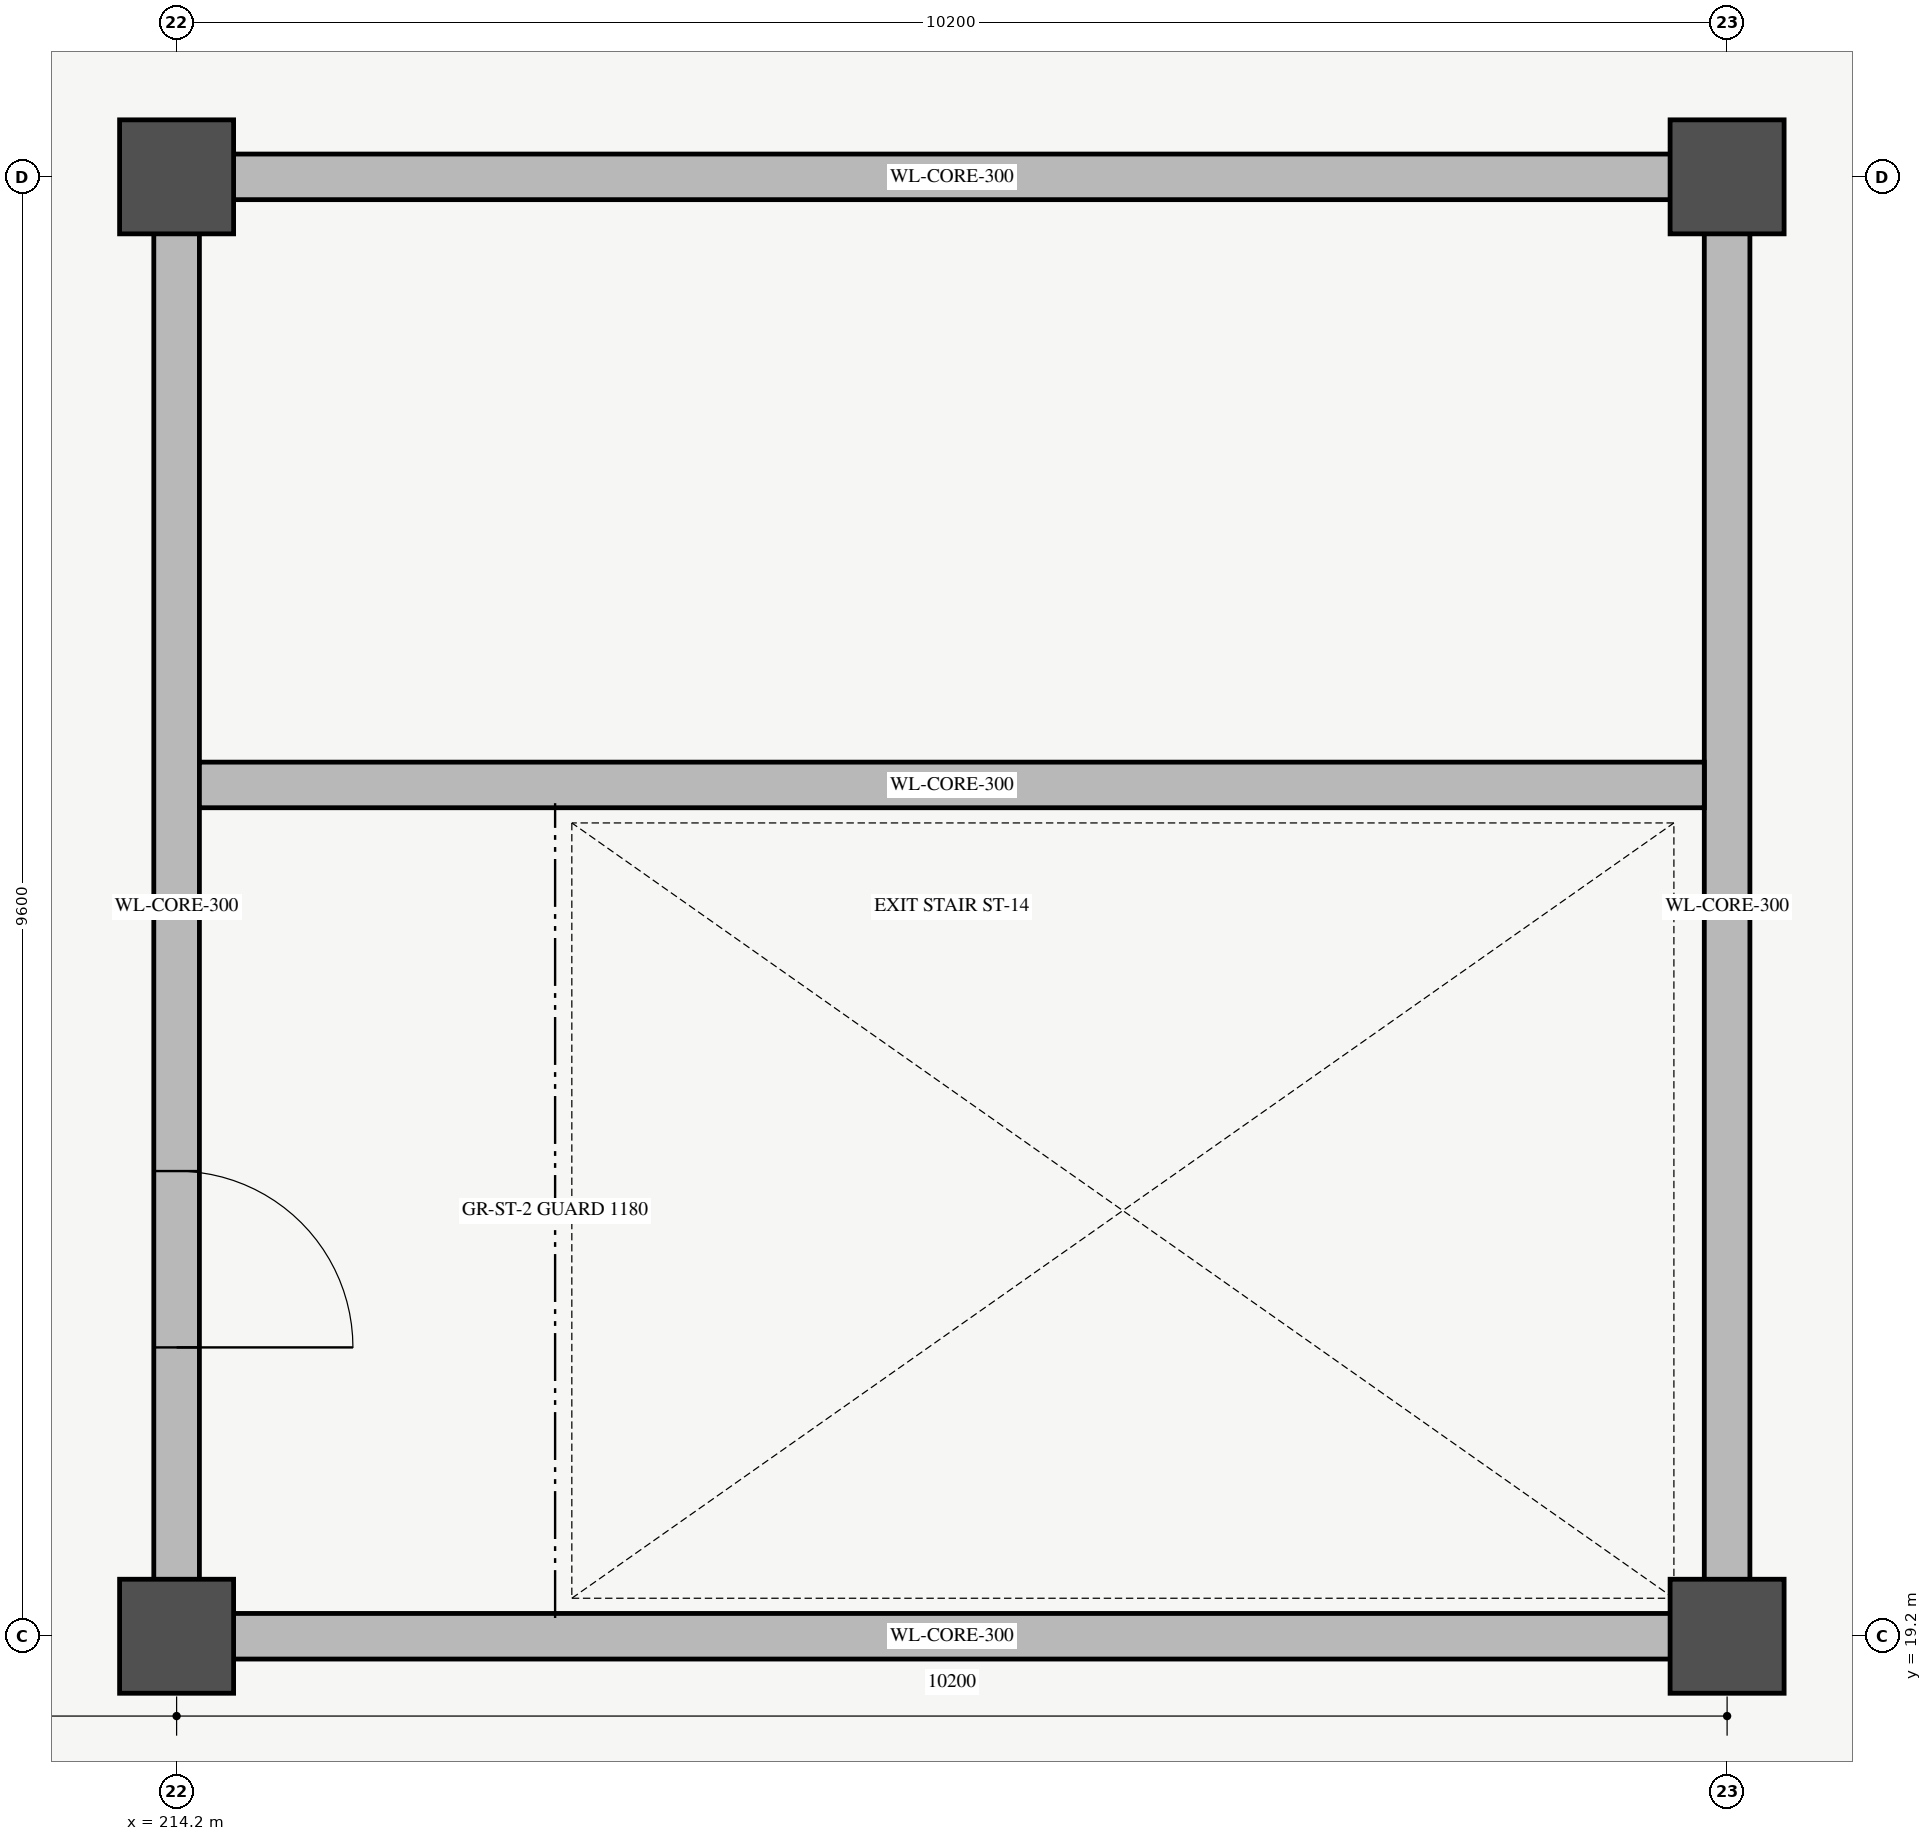
"""IFC4 building model, lengths in metres.
Left out: names, types, materials, properties, quantities, classifications, styles, units other than length and angle.
Written with IfcOpenShell. Run it as: python <this file> out.ifc"""

import sys

from ifc_helpers import new_model, si_unit, direction, frame, frame_2d, origin, origin_2d, place, context, subcontext, project, spatial, rectangle, extrude, element, fill, save


model = new_model("IFC4")
c1 = context("Model", 3, precision=1e-05, world=origin(), true_north=direction((0.0, 1.0)))
c2 = subcontext(c1, "Body", "Model", "MODEL_VIEW")
j1 = project(units=[si_unit("LENGTHUNIT", "METRE"), si_unit("PLANEANGLEUNIT", "RADIAN")], contexts=[c1])
p1 = place(None, origin())
s1 = spatial("IfcSite", under=j1, at=p1, CompositionType="ELEMENT")
p2 = place(p1, origin())
s2 = spatial("IfcBuilding", under=s1, at=p2, CompositionType="ELEMENT")
p3 = place(p2, frame((0.0, 0.0, 10.8)))
s3 = spatial("IfcBuildingStorey", under=s2, at=p3, CompositionType="ELEMENT", Elevation=10.8)
for number, where, z_axis, x_axis in (
    (1, (214.2, 19.2, 0.0), (0.0, 0.0, 1.0), (1.0, 0.0, 0.0)),
    (2, (214.2, 28.8, 0.0), (0.0, 0.0, 1.0), (1.0, 0.0, 0.0)),
    (3, (224.4, 19.2, 0.0), (0.0, 0.0, 1.0), (1.0, 0.0, 0.0)),
    (4, (224.4, 28.8, 0.0), (0.0, 0.0, 1.0), (1.0, 0.0, 0.0)),
):
    element("IfcColumn", number, at=place(p3, frame(where, z_axis=z_axis, x_axis=x_axis)), inside=s3, PredefinedType="COLUMN", context=c2, shape_type="SweptSolid", body=[
        extrude(rectangle(XDim=0.75, YDim=0.75, at=origin_2d()), origin(), (0.0, 0.0, 1.0), 4.2),
    ])
for number, where, z_axis, x_axis in (
    (5, (214.2, 19.2, 0.0), (0.0, 0.0, 1.0), (1.0, 0.0, 0.0)),
    (6, (214.2, 28.8, 0.0), (0.0, 0.0, 1.0), (1.0, 0.0, 0.0)),
):
    element("IfcWall", number, at=place(p3, frame(where, z_axis=z_axis, x_axis=x_axis)), inside=s3, PredefinedType="SHEAR", context=c2, shape_type="SweptSolid", body=[
        extrude(rectangle(XDim=10.2, YDim=0.3, at=frame_2d((5.1, 0.0))), origin(), (0.0, 0.0, 1.0), 4.2),
    ])
p4 = place(p3, frame((214.2, 19.2, 0.0), z_axis=(0.0, 0.0, 1.0), x_axis=(0.0, 1.0, 0.0)))
e7 = element("IfcWall", 7, at=p4, inside=s3, PredefinedType="SHEAR", context=c2, shape_type="SweptSolid", body=[
    extrude(rectangle(XDim=9.6, YDim=0.3, at=frame_2d((4.8, 0.0))), origin(), (0.0, 0.0, 1.0), 4.2),
])
p5 = place(p4, frame((1.9, 0.0, 0.0)))
e8 = element("IfcOpeningElement", 8, at=p5, cuts=e7, PredefinedType="OPENING", context=c2, shape_type="SweptSolid", body=[
    extrude(rectangle(XDim=1.16, YDim=2.2, at=frame_2d((0.58, 1.1))), frame((0.0, 0.16, 0.0), z_axis=(0.0, -1.0, 0.0), x_axis=(1.0, 0.0, 0.0)), (0.0, 0.0, 1.0), 0.32),
])
p6 = place(p3, frame((224.4, 19.2, 0.0), z_axis=(0.0, 0.0, 1.0), x_axis=(0.0, 1.0, 0.0)))
e9 = element("IfcWall", 9, at=p6, inside=s3, PredefinedType="SHEAR", context=c2, shape_type="SweptSolid", body=[
    extrude(rectangle(XDim=9.6, YDim=0.3, at=frame_2d((4.8, 0.0))), origin(), (0.0, 0.0, 1.0), 4.2),
])
p7 = place(p3, frame((214.35, 24.8, 0.0), z_axis=(0.0, 0.0, 1.0), x_axis=(1.0, 0.0, 0.0)))
e10 = element("IfcWall", 10, at=p7, inside=s3, PredefinedType="SHEAR", context=c2, shape_type="SweptSolid", body=[
    extrude(rectangle(XDim=9.9, YDim=0.3, at=frame_2d((4.95, 0.0))), origin(), (0.0, 0.0, 1.0), 4.2),
])
p8 = place(p5, origin())
e11 = element("IfcDoor", 11, at=p8, inside=s3, OperationType="SINGLE_SWING_LEFT", PredefinedType="DOOR", context=c2, shape_type="SweptSolid", body=[
    extrude(rectangle(XDim=1.16, YDim=2.2, at=frame_2d((0.58, 1.1))), frame((0.0, 0.025, 0.0), z_axis=(0.0, -1.0, 0.0), x_axis=(1.0, 0.0, 0.0)), (0.0, 0.0, 1.0), 0.05),
])
fill(e8, e11)
save(model, sys.argv[1])
